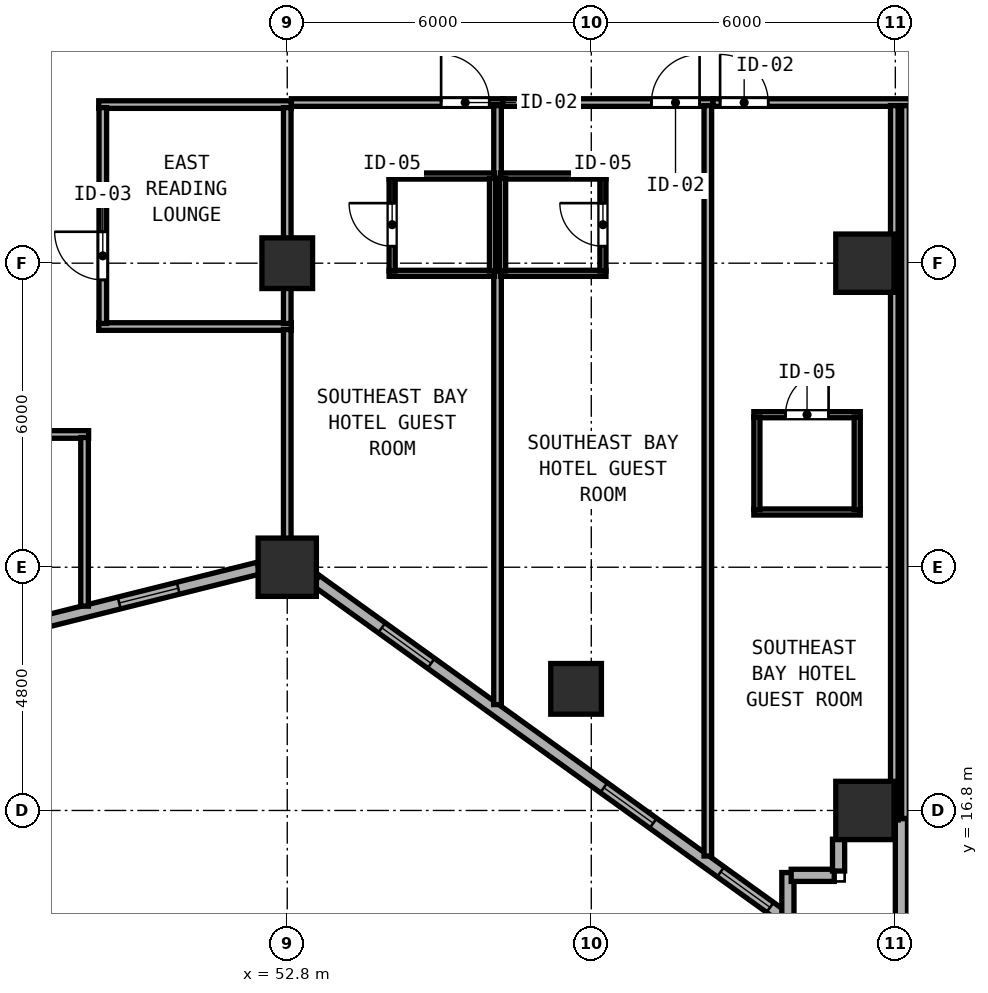
"""IFC4 building model, lengths in metres.
Left out: names, types, materials, properties, quantities, classifications, styles, units other than length and angle.
Written with IfcOpenShell. Run it as: python <this file> out.ifc"""

import sys

from ifc_helpers import new_model, si_unit, direction, frame, frame_2d, origin, origin_2d, place, context, subcontext, project, spatial, rectangle, hollow_rectangle, extrude, element, fill, save


model = new_model("IFC4")
c1 = context("Model", 3, precision=1e-05, world=origin(), true_north=direction((0.0, 1.0)))
c2 = subcontext(c1, "Body", "Model", "MODEL_VIEW")
j1 = project(units=[si_unit("LENGTHUNIT", "METRE"), si_unit("PLANEANGLEUNIT", "RADIAN")], contexts=[c1])
p1 = place(None, origin())
s1 = spatial("IfcSite", under=j1, at=p1, CompositionType="ELEMENT")
p2 = place(p1, origin())
s2 = spatial("IfcBuilding", under=s1, at=p2, CompositionType="ELEMENT")
p3 = place(p2, frame((0.0, 0.0, 85.6)))
s3 = spatial("IfcBuildingStorey", under=s2, at=p3, CompositionType="ELEMENT", Elevation=85.6)
for number, where, z_axis, x_axis in (
    (1, (52.8, 21.6, 0.0), (0.0, 0.0, 1.0), (1.0, 0.0, 0.0)),
    (2, (64.2, 16.8, 0.0), (0.0, 0.0, 1.0), (1.0, 0.0, 0.0)),
    (3, (64.2, 27.6, 0.0), (0.0, 0.0, 1.0), (1.0, 0.0, 0.0)),
):
    element("IfcColumn", number, at=place(p3, frame(where, z_axis=z_axis, x_axis=x_axis)), inside=s3, PredefinedType="COLUMN", context=c2, shape_type="SweptSolid", body=[
        extrude(hollow_rectangle(XDim=1.15, YDim=1.15, WallThickness=0.042, at=origin_2d()), origin(), (0.0, 0.0, 1.0), 3.8),
    ])
for number, where, z_axis, x_axis in (
    (4, (52.8, 27.6, 0.0), (0.0, 0.0, 1.0), (1.0, 0.0, 0.0)),
    (5, (58.5, 19.2, 0.0), (0.0, 0.0, 1.0), (1.0, 0.0, 0.0)),
):
    element("IfcColumn", number, at=place(p3, frame(where, z_axis=z_axis, x_axis=x_axis)), inside=s3, PredefinedType="COLUMN", context=c2, shape_type="SweptSolid", body=[
        extrude(hollow_rectangle(XDim=1.0, YDim=1.0, WallThickness=0.038, at=origin_2d()), origin(), (0.0, 0.0, 1.0), 3.8),
    ])
p4 = place(p3, frame((47.932, 20.507, 0.0), z_axis=(0.0, 0.0, 1.0), x_axis=(0.970145739396, 0.242522667667, 0.0)))
e6 = element("IfcWall", 6, at=p4, inside=s3, PredefinedType="SOLIDWALL", context=c2, shape_type="SweptSolid", body=[
    extrude(rectangle(XDim=4.433, YDim=0.24, at=frame_2d((2.217, 0.0))), origin(), (0.0, 0.0, 1.0), 3.037),
])
p5 = place(p4, frame((1.6, 0.0, 0.85)))
e7 = element("IfcOpeningElement", 7, at=p5, cuts=e6, PredefinedType="OPENING", context=c2, shape_type="SweptSolid", body=[
    extrude(rectangle(XDim=1.2, YDim=1.85, at=frame_2d((0.6, 0.925))), frame((0.0, 0.13, 0.0), z_axis=(0.0, -1.0, 0.0), x_axis=(1.0, 0.0, 0.0)), (0.0, 0.0, 1.0), 0.26),
])
p6 = place(p3, frame((53.367, 21.34, 0.0), z_axis=(0.0, 0.0, 1.0), x_axis=(0.811543176492, -0.58429245476, 0.0)))
e8 = element("IfcWall", 8, at=p6, inside=s3, PredefinedType="SOLIDWALL", context=c2, shape_type="SweptSolid", body=[
    extrude(rectangle(XDim=11.531, YDim=0.24, at=frame_2d((5.765, 0.0))), origin(), (0.0, 0.0, 1.0), 3.037),
])
p7 = place(p6, frame((1.6, 0.0, 0.85)))
e9 = element("IfcOpeningElement", 9, at=p7, cuts=e8, PredefinedType="OPENING", context=c2, shape_type="SweptSolid", body=[
    extrude(rectangle(XDim=1.2, YDim=1.85, at=frame_2d((0.6, 0.925))), frame((0.0, 0.13, 0.0), z_axis=(0.0, -1.0, 0.0), x_axis=(1.0, 0.0, 0.0)), (0.0, 0.0, 1.0), 0.26),
])
p8 = place(p6, frame((7.0, 0.0, 0.85)))
e10 = element("IfcOpeningElement", 10, at=p8, cuts=e8, PredefinedType="OPENING", context=c2, shape_type="SweptSolid", body=[
    extrude(rectangle(XDim=1.2, YDim=1.85, at=frame_2d((0.6, 0.925))), frame((0.0, 0.13, 0.0), z_axis=(0.0, -1.0, 0.0), x_axis=(1.0, 0.0, 0.0)), (0.0, 0.0, 1.0), 0.26),
])
p9 = place(p6, frame((9.842, 0.0, 0.85)))
e11 = element("IfcOpeningElement", 11, at=p9, cuts=e8, PredefinedType="OPENING", context=c2, shape_type="SweptSolid", body=[
    extrude(rectangle(XDim=1.2, YDim=1.85, at=frame_2d((0.6, 0.925))), frame((0.0, 0.13, 0.0), z_axis=(0.0, -1.0, 0.0), x_axis=(1.0, 0.0, 0.0)), (0.0, 0.0, 1.0), 0.26),
])
p10 = place(p3, frame((62.68, 14.579, 0.0), z_axis=(0.0, 0.0, 1.0), x_axis=(0.0, 1.0, 0.0)))
e12 = element("IfcWall", 12, at=p10, inside=s3, PredefinedType="SOLIDWALL", context=c2, shape_type="SweptSolid", body=[
    extrude(rectangle(XDim=0.996, YDim=0.24, at=frame_2d((0.498, 0.0))), origin(), (0.0, 0.0, 1.0), 3.54),
])
p11 = place(p3, frame((62.745, 15.52, 0.0), z_axis=(0.0, 0.0, 1.0), x_axis=(1.0, 0.0, 0.0)))
e13 = element("IfcWall", 13, at=p11, inside=s3, PredefinedType="SOLIDWALL", context=c2, shape_type="SweptSolid", body=[
    extrude(rectangle(XDim=0.85, YDim=0.24, at=frame_2d((0.425, 0.0))), origin(), (0.0, 0.0, 1.0), 3.54),
])
p12 = place(p3, frame((63.68, 15.605, 0.0), z_axis=(0.0, 0.0, 1.0), x_axis=(0.0, 1.0, 0.0)))
e14 = element("IfcWall", 14, at=p12, inside=s3, PredefinedType="SOLIDWALL", context=c2, shape_type="SweptSolid", body=[
    extrude(rectangle(XDim=0.628, YDim=0.24, at=frame_2d((0.314, 0.0))), origin(), (0.0, 0.0, 1.0), 3.54),
])
p13 = place(p3, frame((64.92, 16.64, 0.0), z_axis=(0.0, 0.0, 1.0), x_axis=(0.0, -1.0, 0.0)))
e15 = element("IfcWall", 15, at=p13, inside=s3, PredefinedType="SOLIDWALL", context=c2, shape_type="SweptSolid", body=[
    extrude(rectangle(XDim=2.243, YDim=0.24, at=frame_2d((1.121, 0.0))), origin(), (0.0, 0.0, 1.0), 3.54),
])
p14 = place(p3, frame((73.388, 31.079, 0.0), z_axis=(0.0, 0.0, 1.0), x_axis=(-0.963197271032, 0.268795493036, 0.0)))
e16 = element("IfcWall", 16, at=p14, inside=s3, PredefinedType="SOLIDWALL", context=c2, shape_type="SweptSolid", body=[
    extrude(rectangle(XDim=9.095, YDim=0.24, at=frame_2d((4.548, 0.0))), origin(), (0.0, 0.0, 1.0), 3.54),
])
p15 = place(p14, frame((1.6, 0.0, 0.85)))
e17 = element("IfcOpeningElement", 17, at=p15, cuts=e16, PredefinedType="OPENING", context=c2, shape_type="SweptSolid", body=[
    extrude(rectangle(XDim=1.2, YDim=1.85, at=frame_2d((0.6, 0.925))), frame((0.0, 0.13, 0.0), z_axis=(0.0, -1.0, 0.0), x_axis=(1.0, 0.0, 0.0)), (0.0, 0.0, 1.0), 0.26),
])
p16 = place(p14, frame((7.0, 0.0, 0.85)))
e18 = element("IfcOpeningElement", 18, at=p16, cuts=e16, PredefinedType="OPENING", context=c2, shape_type="SweptSolid", body=[
    extrude(rectangle(XDim=1.2, YDim=1.85, at=frame_2d((0.6, 0.925))), frame((0.0, 0.13, 0.0), z_axis=(0.0, -1.0, 0.0), x_axis=(1.0, 0.0, 0.0)), (0.0, 0.0, 1.0), 0.26),
])
for number, where, z_axis, x_axis in (
    (19, (49.08, 30.73, 0.0), (0.0, 0.0, 1.0), (1.0, 0.0, 0.0)),
    (20, (49.08, 26.35, 0.0), (0.0, 0.0, 1.0), (1.0, 0.0, 0.0)),
):
    element("IfcWall", number, at=place(p3, frame(where, z_axis=z_axis, x_axis=x_axis)), inside=s3, PredefinedType="PARTITIONING", context=c2, shape_type="SweptSolid", body=[
        extrude(rectangle(XDim=3.8, YDim=0.15, at=frame_2d((1.9, 0.0))), origin(), (0.0, 0.0, 1.0), 3.54),
    ])
p17 = place(p3, frame((49.16, 26.41, 0.0), z_axis=(0.0, 0.0, 1.0), x_axis=(0.0, 1.0, 0.0)))
e21 = element("IfcWall", 21, at=p17, inside=s3, PredefinedType="PARTITIONING", context=c2, shape_type="SweptSolid", body=[
    extrude(rectangle(XDim=4.26, YDim=0.15, at=frame_2d((2.13, 0.0))), origin(), (0.0, 0.0, 1.0), 3.54),
])
p18 = place(p17, frame((0.86, 0.0, 0.0)))
e22 = element("IfcOpeningElement", 22, at=p18, cuts=e21, PredefinedType="OPENING", context=c2, shape_type="SweptSolid", body=[
    extrude(rectangle(XDim=0.95, YDim=2.12, at=frame_2d((0.475, 1.06))), frame((0.0, 0.085, 0.0), z_axis=(0.0, -1.0, 0.0), x_axis=(1.0, 0.0, 0.0)), (0.0, 0.0, 1.0), 0.17),
])
p19 = place(p3, frame((52.8, 26.41, 0.0), z_axis=(0.0, 0.0, 1.0), x_axis=(0.0, 1.0, 0.0)))
e23 = element("IfcWall", 23, at=p19, inside=s3, PredefinedType="PARTITIONING", context=c2, shape_type="SweptSolid", body=[
    extrude(rectangle(XDim=4.26, YDim=0.15, at=frame_2d((2.13, 0.0))), origin(), (0.0, 0.0, 1.0), 3.037),
])
p20 = place(p3, frame((41.682, 24.22, 0.0), z_axis=(0.0, 0.0, 1.0), x_axis=(1.0, 0.0, 0.0)))
e24 = element("IfcWall", 24, at=p20, inside=s3, PredefinedType="PARTITIONING", context=c2, shape_type="SweptSolid", body=[
    extrude(rectangle(XDim=7.198, YDim=0.15, at=frame_2d((3.599, 0.0))), origin(), (0.0, 0.0, 1.0), 3.54),
])
p21 = place(p20, frame((3.913, 0.0, 0.0), z_axis=(0.0, 0.0, 1.0), x_axis=(-1.0, 0.0, 0.0)))
e25 = element("IfcOpeningElement", 25, at=p21, cuts=e24, PredefinedType="OPENING", context=c2, shape_type="SweptSolid", body=[
    extrude(rectangle(XDim=0.95, YDim=2.12, at=frame_2d((0.475, 1.06))), frame((0.0, 0.085, 0.0), z_axis=(0.0, -1.0, 0.0), x_axis=(1.0, 0.0, 0.0)), (0.0, 0.0, 1.0), 0.17),
])
p22 = place(p3, frame((48.8, 20.832, 0.0), z_axis=(0.0, 0.0, 1.0), x_axis=(0.0, 1.0, 0.0)))
e26 = element("IfcWall", 26, at=p22, inside=s3, PredefinedType="PARTITIONING", context=c2, shape_type="SweptSolid", body=[
    extrude(rectangle(XDim=3.328, YDim=0.15, at=frame_2d((1.664, 0.0))), origin(), (0.0, 0.0, 1.0), 3.54),
])
p23 = place(p3, frame((52.882, 30.77, 0.0), z_axis=(0.0, 0.0, 1.0), x_axis=(1.0, 0.0, 0.0)))
e27 = element("IfcWall", 27, at=p23, inside=s3, PredefinedType="PARTITIONING", context=c2, shape_type="SweptSolid", body=[
    extrude(rectangle(XDim=4.168, YDim=0.15, at=frame_2d((2.084, 0.0))), origin(), (0.0, 0.0, 1.0), 3.54),
])
p24 = place(p23, frame((3.905, 0.0, 0.0), z_axis=(0.0, 0.0, 1.0), x_axis=(-1.0, 0.0, 0.0)))
e28 = element("IfcOpeningElement", 28, at=p24, cuts=e27, PredefinedType="OPENING", context=c2, shape_type="SweptSolid", body=[
    extrude(rectangle(XDim=0.95, YDim=2.15, at=frame_2d((0.475, 1.075))), frame((0.0, 0.085, 0.0), z_axis=(0.0, -1.0, 0.0), x_axis=(1.0, 0.0, 0.0)), (0.0, 0.0, 1.0), 0.17),
])
p25 = place(p3, frame((52.8, 21.819, 0.0), z_axis=(0.0, 0.0, 1.0), x_axis=(0.0, 1.0, 0.0)))
e29 = element("IfcWall", 29, at=p25, inside=s3, PredefinedType="PARTITIONING", context=c2, shape_type="SweptSolid", body=[
    extrude(rectangle(XDim=4.471, YDim=0.15, at=frame_2d((2.236, 0.0))), origin(), (0.0, 0.0, 1.0), 3.037),
])
p26 = place(p3, frame((56.95, 18.889, 0.0), z_axis=(0.0, 0.0, 1.0), x_axis=(0.0, 1.0, 0.0)))
e30 = element("IfcWall", 30, at=p26, inside=s3, PredefinedType="PARTITIONING", context=c2, shape_type="SweptSolid", body=[
    extrude(rectangle(XDim=11.821, YDim=0.15, at=frame_2d((5.91, 0.0))), origin(), (0.0, 0.0, 1.0), 3.54),
])
p27 = place(p3, frame((54.81, 29.32, 0.0), z_axis=(0.0, 0.0, 1.0), x_axis=(1.0, 0.0, 0.0)))
e31 = element("IfcWall", 31, at=p27, inside=s3, PredefinedType="PARTITIONING", context=c2, shape_type="SweptSolid", body=[
    extrude(rectangle(XDim=2.08, YDim=0.12, at=frame_2d((1.04, 0.0))), origin(), (0.0, 0.0, 1.0), 3.54),
])
p28 = place(p3, frame((54.81, 27.4, 0.0), z_axis=(0.0, 0.0, 1.0), x_axis=(1.0, 0.0, 0.0)))
e32 = element("IfcWall", 32, at=p28, inside=s3, PredefinedType="PARTITIONING", context=c2, shape_type="SweptSolid", body=[
    extrude(rectangle(XDim=2.08, YDim=0.12, at=frame_2d((1.04, 0.0))), origin(), (0.0, 0.0, 1.0), 3.037),
])
p29 = place(p3, frame((54.87, 27.445, 0.0), z_axis=(0.0, 0.0, 1.0), x_axis=(0.0, 1.0, 0.0)))
e33 = element("IfcWall", 33, at=p29, inside=s3, PredefinedType="PARTITIONING", context=c2, shape_type="SweptSolid", body=[
    extrude(rectangle(XDim=1.83, YDim=0.12, at=frame_2d((0.915, 0.0))), origin(), (0.0, 0.0, 1.0), 3.54),
])
p30 = place(p29, frame((1.34, 0.0, 0.0), z_axis=(0.0, 0.0, 1.0), x_axis=(-1.0, 0.0, 0.0)))
e34 = element("IfcOpeningElement", 34, at=p30, cuts=e33, PredefinedType="OPENING", context=c2, shape_type="SweptSolid", body=[
    extrude(rectangle(XDim=0.85, YDim=2.1, at=frame_2d((0.425, 1.05))), frame((0.0, 0.07, 0.0), z_axis=(0.0, -1.0, 0.0), x_axis=(1.0, 0.0, 0.0)), (0.0, 0.0, 1.0), 0.14),
])
p31 = place(p3, frame((56.85, 27.445, 0.0), z_axis=(0.0, 0.0, 1.0), x_axis=(0.0, 1.0, 0.0)))
e35 = element("IfcWall", 35, at=p31, inside=s3, PredefinedType="PARTITIONING", context=c2, shape_type="SweptSolid", body=[
    extrude(rectangle(XDim=1.83, YDim=0.12, at=frame_2d((0.915, 0.0))), origin(), (0.0, 0.0, 1.0), 3.54),
])
p32 = place(p3, frame((57.052, 30.77, 0.0), z_axis=(0.0, 0.0, 1.0), x_axis=(1.0, 0.0, 0.0)))
e36 = element("IfcWall", 36, at=p32, inside=s3, PredefinedType="PARTITIONING", context=c2, shape_type="SweptSolid", body=[
    extrude(rectangle(XDim=4.148, YDim=0.15, at=frame_2d((2.074, 0.0))), origin(), (0.0, 0.0, 1.0), 3.54),
])
p33 = place(p32, frame((3.885, 0.0, 0.0), z_axis=(0.0, 0.0, 1.0), x_axis=(-1.0, 0.0, 0.0)))
e37 = element("IfcOpeningElement", 37, at=p33, cuts=e36, PredefinedType="OPENING", context=c2, shape_type="SweptSolid", body=[
    extrude(rectangle(XDim=0.95, YDim=2.15, at=frame_2d((0.475, 1.075))), frame((0.0, 0.085, 0.0), z_axis=(0.0, -1.0, 0.0), x_axis=(1.0, 0.0, 0.0)), (0.0, 0.0, 1.0), 0.17),
])
p34 = place(p3, frame((61.1, 15.901, 0.0), z_axis=(0.0, 0.0, 1.0), x_axis=(0.0, 1.0, 0.0)))
e38 = element("IfcWall", 38, at=p34, inside=s3, PredefinedType="PARTITIONING", context=c2, shape_type="SweptSolid", body=[
    extrude(rectangle(XDim=14.809, YDim=0.15, at=frame_2d((7.404, 0.0))), origin(), (0.0, 0.0, 1.0), 3.54),
])
p35 = place(p3, frame((57.01, 29.32, 0.0), z_axis=(0.0, 0.0, 1.0), x_axis=(1.0, 0.0, 0.0)))
e39 = element("IfcWall", 39, at=p35, inside=s3, PredefinedType="PARTITIONING", context=c2, shape_type="SweptSolid", body=[
    extrude(rectangle(XDim=2.08, YDim=0.12, at=frame_2d((1.04, 0.0))), origin(), (0.0, 0.0, 1.0), 3.54),
])
p36 = place(p3, frame((57.01, 27.4, 0.0), z_axis=(0.0, 0.0, 1.0), x_axis=(1.0, 0.0, 0.0)))
e40 = element("IfcWall", 40, at=p36, inside=s3, PredefinedType="PARTITIONING", context=c2, shape_type="SweptSolid", body=[
    extrude(rectangle(XDim=2.08, YDim=0.12, at=frame_2d((1.04, 0.0))), origin(), (0.0, 0.0, 1.0), 3.037),
])
p37 = place(p3, frame((57.05, 27.445, 0.0), z_axis=(0.0, 0.0, 1.0), x_axis=(0.0, 1.0, 0.0)))
e41 = element("IfcWall", 41, at=p37, inside=s3, PredefinedType="PARTITIONING", context=c2, shape_type="SweptSolid", body=[
    extrude(rectangle(XDim=1.83, YDim=0.12, at=frame_2d((0.915, 0.0))), origin(), (0.0, 0.0, 1.0), 3.54),
])
p38 = place(p3, frame((59.03, 27.445, 0.0), z_axis=(0.0, 0.0, 1.0), x_axis=(0.0, 1.0, 0.0)))
e42 = element("IfcWall", 42, at=p38, inside=s3, PredefinedType="PARTITIONING", context=c2, shape_type="SweptSolid", body=[
    extrude(rectangle(XDim=1.83, YDim=0.12, at=frame_2d((0.915, 0.0))), origin(), (0.0, 0.0, 1.0), 3.54),
])
p39 = place(p38, frame((0.49, 0.0, 0.0)))
e43 = element("IfcOpeningElement", 43, at=p39, cuts=e42, PredefinedType="OPENING", context=c2, shape_type="SweptSolid", body=[
    extrude(rectangle(XDim=0.85, YDim=2.1, at=frame_2d((0.425, 1.05))), frame((0.0, 0.07, 0.0), z_axis=(0.0, -1.0, 0.0), x_axis=(1.0, 0.0, 0.0)), (0.0, 0.0, 1.0), 0.14),
])
p40 = place(p3, frame((61.202, 30.77, 0.0), z_axis=(0.0, 0.0, 1.0), x_axis=(1.0, 0.0, 0.0)))
e44 = element("IfcWall", 44, at=p40, inside=s3, PredefinedType="PARTITIONING", context=c2, shape_type="SweptSolid", body=[
    extrude(rectangle(XDim=3.898, YDim=0.15, at=frame_2d((1.949, 0.0))), origin(), (0.0, 0.0, 1.0), 3.54),
])
p41 = place(p40, frame((1.09, 0.0, 0.0), z_axis=(0.0, 0.0, 1.0), x_axis=(-1.0, 0.0, 0.0)))
e45 = element("IfcOpeningElement", 45, at=p41, cuts=e44, PredefinedType="OPENING", context=c2, shape_type="SweptSolid", body=[
    extrude(rectangle(XDim=0.95, YDim=2.15, at=frame_2d((0.475, 1.075))), frame((0.0, 0.085, 0.0), z_axis=(0.0, -1.0, 0.0), x_axis=(1.0, 0.0, 0.0)), (0.0, 0.0, 1.0), 0.17),
])
p42 = place(p3, frame((65.0, 16.642, 0.0), z_axis=(0.0, 0.0, 1.0), x_axis=(0.0, 1.0, 0.0)))
e46 = element("IfcWall", 46, at=p42, inside=s3, PredefinedType="PARTITIONING", context=c2, shape_type="SweptSolid", body=[
    extrude(rectangle(XDim=14.068, YDim=0.15, at=frame_2d((7.034, 0.0))), origin(), (0.0, 0.0, 1.0), 3.54),
])
p43 = place(p3, frame((62.008, 24.61, 0.0), z_axis=(0.0, 0.0, 1.0), x_axis=(1.0, 0.0, 0.0)))
e47 = element("IfcWall", 47, at=p43, inside=s3, PredefinedType="PARTITIONING", context=c2, shape_type="SweptSolid", body=[
    extrude(rectangle(XDim=2.1, YDim=0.12, at=frame_2d((1.05, 0.0))), origin(), (0.0, 0.0, 1.0), 3.54),
])
p44 = place(p43, frame((1.475, 0.0, 0.0), z_axis=(0.0, 0.0, 1.0), x_axis=(-1.0, 0.0, 0.0)))
e48 = element("IfcOpeningElement", 48, at=p44, cuts=e47, PredefinedType="OPENING", context=c2, shape_type="SweptSolid", body=[
    extrude(rectangle(XDim=0.85, YDim=2.1, at=frame_2d((0.425, 1.05))), frame((0.0, 0.07, 0.0), z_axis=(0.0, -1.0, 0.0), x_axis=(1.0, 0.0, 0.0)), (0.0, 0.0, 1.0), 0.14),
])
p45 = place(p3, frame((62.008, 22.69, 0.0), z_axis=(0.0, 0.0, 1.0), x_axis=(1.0, 0.0, 0.0)))
e49 = element("IfcWall", 49, at=p45, inside=s3, PredefinedType="PARTITIONING", context=c2, shape_type="SweptSolid", body=[
    extrude(rectangle(XDim=2.1, YDim=0.12, at=frame_2d((1.05, 0.0))), origin(), (0.0, 0.0, 1.0), 3.54),
])
p46 = place(p3, frame((62.068, 22.735, 0.0), z_axis=(0.0, 0.0, 1.0), x_axis=(0.0, 1.0, 0.0)))
e50 = element("IfcWall", 50, at=p46, inside=s3, PredefinedType="PARTITIONING", context=c2, shape_type="SweptSolid", body=[
    extrude(rectangle(XDim=1.83, YDim=0.12, at=frame_2d((0.915, 0.0))), origin(), (0.0, 0.0, 1.0), 3.54),
])
p47 = place(p3, frame((64.048, 22.735, 0.0), z_axis=(0.0, 0.0, 1.0), x_axis=(0.0, 1.0, 0.0)))
e51 = element("IfcWall", 51, at=p47, inside=s3, PredefinedType="PARTITIONING", context=c2, shape_type="SweptSolid", body=[
    extrude(rectangle(XDim=1.83, YDim=0.12, at=frame_2d((0.915, 0.0))), origin(), (0.0, 0.0, 1.0), 3.037),
])
p48 = place(p3, frame((64.78, 16.612, 0.0), z_axis=(0.0, 0.0, 1.0), x_axis=(0.0, 1.0, 0.0)))
e52 = element("IfcWall", 52, at=p48, inside=s3, PredefinedType="PARTITIONING", context=c2, shape_type="SweptSolid", body=[
    extrude(rectangle(XDim=14.098, YDim=0.15, at=frame_2d((7.049, 0.0))), origin(), (0.0, 0.0, 1.0), 3.54),
])
p49 = place(p5, origin())
e53 = element("IfcWindow", 53, at=p49, inside=s3, PartitioningType="SINGLE_PANEL", PredefinedType="WINDOW", context=c2, shape_type="SweptSolid", body=[
    extrude(rectangle(XDim=1.2, YDim=1.85, at=frame_2d((0.6, 0.925))), frame((0.0, 0.03, 0.0), z_axis=(0.0, -1.0, 0.0), x_axis=(1.0, 0.0, 0.0)), (0.0, 0.0, 1.0), 0.06),
])
fill(e7, e53)
p50 = place(p7, origin())
e54 = element("IfcWindow", 54, at=p50, inside=s3, PartitioningType="SINGLE_PANEL", PredefinedType="WINDOW", context=c2, shape_type="SweptSolid", body=[
    extrude(rectangle(XDim=1.2, YDim=1.85, at=frame_2d((0.6, 0.925))), frame((0.0, 0.03, 0.0), z_axis=(0.0, -1.0, 0.0), x_axis=(1.0, 0.0, 0.0)), (0.0, 0.0, 1.0), 0.06),
])
fill(e9, e54)
p51 = place(p8, origin())
e55 = element("IfcWindow", 55, at=p51, inside=s3, PartitioningType="SINGLE_PANEL", PredefinedType="WINDOW", context=c2, shape_type="SweptSolid", body=[
    extrude(rectangle(XDim=1.2, YDim=1.85, at=frame_2d((0.6, 0.925))), frame((0.0, 0.03, 0.0), z_axis=(0.0, -1.0, 0.0), x_axis=(1.0, 0.0, 0.0)), (0.0, 0.0, 1.0), 0.06),
])
fill(e10, e55)
p52 = place(p18, origin())
e56 = element("IfcDoor", 56, at=p52, inside=s3, OperationType="SINGLE_SWING_RIGHT", PredefinedType="DOOR", context=c2, shape_type="SweptSolid", body=[
    extrude(rectangle(XDim=0.95, YDim=2.12, at=frame_2d((0.475, 1.06))), frame((0.0, 0.025, 0.0), z_axis=(0.0, -1.0, 0.0), x_axis=(1.0, 0.0, 0.0)), (0.0, 0.0, 1.0), 0.05),
])
fill(e22, e56)
p53 = place(p24, origin())
e57 = element("IfcDoor", 57, at=p53, inside=s3, OperationType="SINGLE_SWING_RIGHT", PredefinedType="DOOR", context=c2, shape_type="SweptSolid", body=[
    extrude(rectangle(XDim=0.95, YDim=2.15, at=frame_2d((0.475, 1.075))), frame((0.0, 0.025, 0.0), z_axis=(0.0, -1.0, 0.0), x_axis=(1.0, 0.0, 0.0)), (0.0, 0.0, 1.0), 0.05),
])
fill(e28, e57)
p54 = place(p30, origin())
e58 = element("IfcDoor", 58, at=p54, inside=s3, OperationType="SINGLE_SWING_LEFT", PredefinedType="DOOR", context=c2, shape_type="SweptSolid", body=[
    extrude(rectangle(XDim=0.85, YDim=2.1, at=frame_2d((0.425, 1.05))), frame((0.0, 0.025, 0.0), z_axis=(0.0, -1.0, 0.0), x_axis=(1.0, 0.0, 0.0)), (0.0, 0.0, 1.0), 0.05),
])
fill(e34, e58)
p55 = place(p33, origin())
e59 = element("IfcDoor", 59, at=p55, inside=s3, OperationType="SINGLE_SWING_LEFT", PredefinedType="DOOR", context=c2, shape_type="SweptSolid", body=[
    extrude(rectangle(XDim=0.95, YDim=2.15, at=frame_2d((0.475, 1.075))), frame((0.0, 0.025, 0.0), z_axis=(0.0, -1.0, 0.0), x_axis=(1.0, 0.0, 0.0)), (0.0, 0.0, 1.0), 0.05),
])
fill(e37, e59)
p56 = place(p39, origin())
e60 = element("IfcDoor", 60, at=p56, inside=s3, OperationType="SINGLE_SWING_RIGHT", PredefinedType="DOOR", context=c2, shape_type="SweptSolid", body=[
    extrude(rectangle(XDim=0.85, YDim=2.1, at=frame_2d((0.425, 1.05))), frame((0.0, 0.025, 0.0), z_axis=(0.0, -1.0, 0.0), x_axis=(1.0, 0.0, 0.0)), (0.0, 0.0, 1.0), 0.05),
])
fill(e43, e60)
p57 = place(p41, origin())
e61 = element("IfcDoor", 61, at=p57, inside=s3, OperationType="SINGLE_SWING_RIGHT", PredefinedType="DOOR", context=c2, shape_type="SweptSolid", body=[
    extrude(rectangle(XDim=0.95, YDim=2.15, at=frame_2d((0.475, 1.075))), frame((0.0, 0.025, 0.0), z_axis=(0.0, -1.0, 0.0), x_axis=(1.0, 0.0, 0.0)), (0.0, 0.0, 1.0), 0.05),
])
fill(e45, e61)
p58 = place(p44, origin())
e62 = element("IfcDoor", 62, at=p58, inside=s3, OperationType="SINGLE_SWING_LEFT", PredefinedType="DOOR", context=c2, shape_type="SweptSolid", body=[
    extrude(rectangle(XDim=0.85, YDim=2.1, at=frame_2d((0.425, 1.05))), frame((0.0, 0.025, 0.0), z_axis=(0.0, -1.0, 0.0), x_axis=(1.0, 0.0, 0.0)), (0.0, 0.0, 1.0), 0.05),
])
fill(e48, e62)
p59 = place(p9, origin())
e63 = element("IfcWindow", 63, at=p59, inside=s3, PartitioningType="SINGLE_PANEL", PredefinedType="WINDOW", context=c2, shape_type="SweptSolid", body=[
    extrude(rectangle(XDim=1.2, YDim=1.85, at=frame_2d((0.6, 0.925))), frame((0.0, 0.03, 0.0), z_axis=(0.0, -1.0, 0.0), x_axis=(1.0, 0.0, 0.0)), (0.0, 0.0, 1.0), 0.06),
])
fill(e11, e63)
save(model, sys.argv[1])
